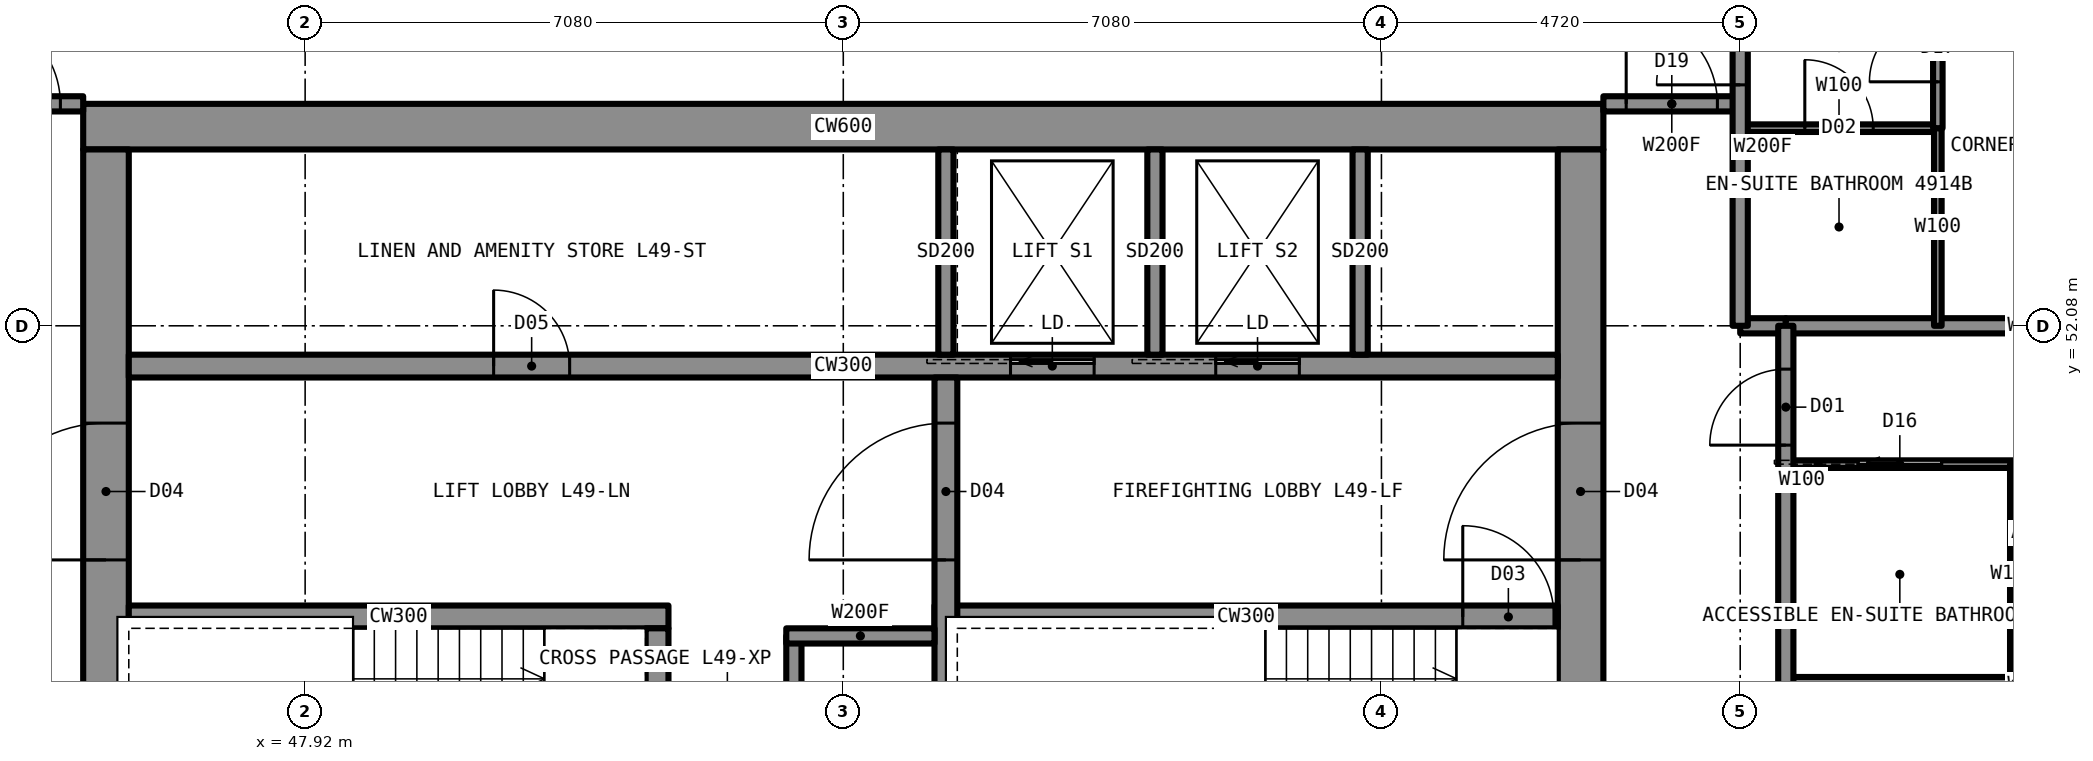
"""IFC4 building model, lengths in metres.
Left out: names, types, materials, properties, quantities, classifications, styles, units other than length and angle.
Written with IfcOpenShell. Run it as: python <this file> out.ifc"""

import sys

from ifc_helpers import new_model, si_unit, direction, frame, frame_2d, origin, place, context, subcontext, project, spatial, rectangle, extrude, element, fill, save


model = new_model("IFC4")
c1 = context("Model", 3, precision=1e-05, world=origin(), true_north=direction((0.0, 1.0)))
c2 = subcontext(c1, "Body", "Model", "MODEL_VIEW")
j1 = project(units=[si_unit("LENGTHUNIT", "METRE"), si_unit("PLANEANGLEUNIT", "RADIAN")], contexts=[c1])
p1 = place(None, origin())
s1 = spatial("IfcSite", under=j1, at=p1, CompositionType="ELEMENT")
p2 = place(p1, origin())
s2 = spatial("IfcBuilding", under=s1, at=p2, CompositionType="ELEMENT")
p3 = place(p2, frame((0.0, 0.0, 182.8)))
s3 = spatial("IfcBuildingStorey", under=s2, at=p3, CompositionType="ELEMENT", Elevation=182.8)
p4 = place(p3, frame((45.0, 54.7, 0.0), z_axis=(0.0, 0.0, 1.0), x_axis=(1.0, 0.0, 0.0)))
e1 = element("IfcWall", 1, at=p4, inside=s3, PredefinedType="SHEAR", context=c2, shape_type="SweptSolid", body=[
    extrude(rectangle(XDim=20.0, YDim=0.6, at=frame_2d((10.0, 0.0))), origin(), (0.0, 0.0, 1.0), 3.5),
])
p5 = place(p3, frame((64.7, 35.6, 0.0), z_axis=(0.0, 0.0, 1.0), x_axis=(0.0, 1.0, 0.0)))
e2 = element("IfcWall", 2, at=p5, inside=s3, PredefinedType="SHEAR", context=c2, shape_type="SweptSolid", body=[
    extrude(rectangle(XDim=18.8, YDim=0.6, at=frame_2d((9.4, 0.0))), origin(), (0.0, 0.0, 1.0), 3.5),
])
p6 = place(p5, frame((13.4, 0.0, 0.0)))
e3 = element("IfcOpeningElement", 3, at=p6, cuts=e2, PredefinedType="OPENING", context=c2, shape_type="SweptSolid", body=[
    extrude(rectangle(XDim=1.8, YDim=2.2, at=frame_2d((0.9, 1.1))), frame((0.0, 0.31, 0.0), z_axis=(0.0, -1.0, 0.0), x_axis=(1.0, 0.0, 0.0)), (0.0, 0.0, 1.0), 0.62),
])
p7 = place(p5, frame((3.6, 0.0, 0.0)))
e4 = element("IfcOpeningElement", 4, at=p7, cuts=e2, PredefinedType="OPENING", context=c2, shape_type="SweptSolid", body=[
    extrude(rectangle(XDim=1.8, YDim=2.2, at=frame_2d((0.9, 1.1))), frame((0.0, 0.31, 0.0), z_axis=(0.0, -1.0, 0.0), x_axis=(1.0, 0.0, 0.0)), (0.0, 0.0, 1.0), 0.62),
])
p8 = place(p3, frame((45.3, 35.6, 0.0), z_axis=(0.0, 0.0, 1.0), x_axis=(0.0, 1.0, 0.0)))
e5 = element("IfcWall", 5, at=p8, inside=s3, PredefinedType="SHEAR", context=c2, shape_type="SweptSolid", body=[
    extrude(rectangle(XDim=18.8, YDim=0.6, at=frame_2d((9.4, 0.0))), origin(), (0.0, 0.0, 1.0), 3.5),
])
p9 = place(p8, frame((13.4, 0.0, 0.0)))
e6 = element("IfcOpeningElement", 6, at=p9, cuts=e5, PredefinedType="OPENING", context=c2, shape_type="SweptSolid", body=[
    extrude(rectangle(XDim=1.8, YDim=2.2, at=frame_2d((0.9, 1.1))), frame((0.0, 0.31, 0.0), z_axis=(0.0, -1.0, 0.0), x_axis=(1.0, 0.0, 0.0)), (0.0, 0.0, 1.0), 0.62),
])
p10 = place(p8, frame((3.6, 0.0, 0.0)))
e7 = element("IfcOpeningElement", 7, at=p10, cuts=e5, PredefinedType="OPENING", context=c2, shape_type="SweptSolid", body=[
    extrude(rectangle(XDim=1.8, YDim=2.2, at=frame_2d((0.9, 1.1))), frame((0.0, 0.31, 0.0), z_axis=(0.0, -1.0, 0.0), x_axis=(1.0, 0.0, 0.0)), (0.0, 0.0, 1.0), 0.62),
])
p11 = place(p8, frame((6.4, 0.0, 0.0)))
e8 = element("IfcOpeningElement", 8, at=p11, cuts=e5, PredefinedType="OPENING", context=c2, shape_type="SweptSolid", body=[
    extrude(rectangle(XDim=1.2, YDim=2.2, at=frame_2d((0.6, 1.1))), frame((0.0, 0.31, 0.0), z_axis=(0.0, -1.0, 0.0), x_axis=(1.0, 0.0, 0.0)), (0.0, 0.0, 1.0), 0.62),
])
p12 = place(p3, frame((45.6, 51.55, 0.0), z_axis=(0.0, 0.0, 1.0), x_axis=(1.0, 0.0, 0.0)))
e9 = element("IfcWall", 9, at=p12, inside=s3, PredefinedType="SHEAR", context=c2, shape_type="SweptSolid", body=[
    extrude(rectangle(XDim=18.8, YDim=0.3, at=frame_2d((9.4, 0.0))), origin(), (0.0, 0.0, 1.0), 3.5),
])
p13 = place(p12, frame((4.8, 0.0, 0.0)))
e10 = element("IfcOpeningElement", 10, at=p13, cuts=e9, PredefinedType="OPENING", context=c2, shape_type="SweptSolid", body=[
    extrude(rectangle(XDim=1.0, YDim=2.1, at=frame_2d((0.5, 1.05))), frame((0.0, 0.16, 0.0), z_axis=(0.0, -1.0, 0.0), x_axis=(1.0, 0.0, 0.0)), (0.0, 0.0, 1.0), 0.32),
])
p14 = place(p12, frame((11.6, 0.0, 0.0)))
e11 = element("IfcOpeningElement", 11, at=p14, cuts=e9, PredefinedType="OPENING", context=c2, shape_type="SweptSolid", body=[
    extrude(rectangle(XDim=1.1, YDim=2.2, at=frame_2d((0.55, 1.1))), frame((0.0, 0.16, 0.0), z_axis=(0.0, -1.0, 0.0), x_axis=(1.0, 0.0, 0.0)), (0.0, 0.0, 1.0), 0.32),
])
p15 = place(p12, frame((14.3, 0.0, 0.0)))
e12 = element("IfcOpeningElement", 12, at=p15, cuts=e9, PredefinedType="OPENING", context=c2, shape_type="SweptSolid", body=[
    extrude(rectangle(XDim=1.1, YDim=2.2, at=frame_2d((0.55, 1.1))), frame((0.0, 0.16, 0.0), z_axis=(0.0, -1.0, 0.0), x_axis=(1.0, 0.0, 0.0)), (0.0, 0.0, 1.0), 0.32),
])
p16 = place(p3, frame((45.6, 48.25, 0.0), z_axis=(0.0, 0.0, 1.0), x_axis=(1.0, 0.0, 0.0)))
e13 = element("IfcWall", 13, at=p16, inside=s3, PredefinedType="SHEAR", context=c2, shape_type="SweptSolid", body=[
    extrude(rectangle(XDim=7.1, YDim=0.3, at=frame_2d((3.55, 0.0))), origin(), (0.0, 0.0, 1.0), 3.5),
])
p17 = place(p3, frame((56.2, 48.25, 0.0), z_axis=(0.0, 0.0, 1.0), x_axis=(1.0, 0.0, 0.0)))
e14 = element("IfcWall", 14, at=p17, inside=s3, PredefinedType="SHEAR", context=c2, shape_type="SweptSolid", body=[
    extrude(rectangle(XDim=8.2, YDim=0.3, at=frame_2d((4.1, 0.0))), origin(), (0.0, 0.0, 1.0), 3.5),
])
p18 = place(p17, frame((6.95, 0.0, 0.0)))
e15 = element("IfcOpeningElement", 15, at=p18, cuts=e14, PredefinedType="OPENING", context=c2, shape_type="SweptSolid", body=[
    extrude(rectangle(XDim=1.2, YDim=2.2, at=frame_2d((0.6, 1.1))), frame((0.0, 0.16, 0.0), z_axis=(0.0, -1.0, 0.0), x_axis=(1.0, 0.0, 0.0)), (0.0, 0.0, 1.0), 0.32),
])
p19 = place(p3, frame((52.55, 41.9, 0.0), z_axis=(0.0, 0.0, 1.0), x_axis=(0.0, 1.0, 0.0)))
e16 = element("IfcWall", 16, at=p19, inside=s3, PredefinedType="SHEAR", context=c2, shape_type="SweptSolid", body=[
    extrude(rectangle(XDim=6.2, YDim=0.3, at=frame_2d((3.1, 0.0))), origin(), (0.0, 0.0, 1.0), 3.5),
])
p20 = place(p19, frame((4.125, 0.0, 0.0)))
e17 = element("IfcOpeningElement", 17, at=p20, cuts=e16, PredefinedType="OPENING", context=c2, shape_type="SweptSolid", body=[
    extrude(rectangle(XDim=1.2, YDim=2.2, at=frame_2d((0.6, 1.1))), frame((0.0, 0.16, 0.0), z_axis=(0.0, -1.0, 0.0), x_axis=(1.0, 0.0, 0.0)), (0.0, 0.0, 1.0), 0.32),
])
p21 = place(p3, frame((56.35, 41.9, 0.0), z_axis=(0.0, 0.0, 1.0), x_axis=(0.0, 1.0, 0.0)))
e18 = element("IfcWall", 18, at=p21, inside=s3, PredefinedType="SHEAR", context=c2, shape_type="SweptSolid", body=[
    extrude(rectangle(XDim=9.5, YDim=0.3, at=frame_2d((4.75, 0.0))), origin(), (0.0, 0.0, 1.0), 3.5),
])
p22 = place(p21, frame((7.1, 0.0, 0.0)))
e19 = element("IfcOpeningElement", 19, at=p22, cuts=e18, PredefinedType="OPENING", context=c2, shape_type="SweptSolid", body=[
    extrude(rectangle(XDim=1.8, YDim=2.2, at=frame_2d((0.9, 1.1))), frame((0.0, 0.16, 0.0), z_axis=(0.0, -1.0, 0.0), x_axis=(1.0, 0.0, 0.0)), (0.0, 0.0, 1.0), 0.32),
])
p23 = place(p3, frame((43.2, 55.0, 0.0), z_axis=(0.0, 0.0, 1.0), x_axis=(1.0, 0.0, 0.0)))
e20 = element("IfcWall", 20, at=p23, inside=s3, PredefinedType="PARTITIONING", context=c2, shape_type="SweptSolid", body=[
    extrude(rectangle(XDim=1.8, YDim=0.2, at=frame_2d((0.9, 0.0))), origin(), (0.0, 0.0, 1.0), 3.33),
])
p24 = place(p23, frame((0.3, 0.0, 0.0)))
e21 = element("IfcOpeningElement", 21, at=p24, cuts=e20, PredefinedType="OPENING", context=c2, shape_type="SweptSolid", body=[
    extrude(rectangle(XDim=1.2, YDim=2.2, at=frame_2d((0.6, 1.1))), frame((0.0, 0.11, 0.0), z_axis=(0.0, -1.0, 0.0), x_axis=(1.0, 0.0, 0.0)), (0.0, 0.0, 1.0), 0.22),
])
p25 = place(p3, frame((65.0, 55.0, 0.0), z_axis=(0.0, 0.0, 1.0), x_axis=(1.0, 0.0, 0.0)))
e22 = element("IfcWall", 22, at=p25, inside=s3, PredefinedType="PARTITIONING", context=c2, shape_type="SweptSolid", body=[
    extrude(rectangle(XDim=1.8, YDim=0.2, at=frame_2d((0.9, 0.0))), origin(), (0.0, 0.0, 1.0), 3.33),
])
p26 = place(p25, frame((0.3, 0.0, 0.0)))
e23 = element("IfcOpeningElement", 23, at=p26, cuts=e22, PredefinedType="OPENING", context=c2, shape_type="SweptSolid", body=[
    extrude(rectangle(XDim=1.2, YDim=2.2, at=frame_2d((0.6, 1.1))), frame((0.0, 0.11, 0.0), z_axis=(0.0, -1.0, 0.0), x_axis=(1.0, 0.0, 0.0)), (0.0, 0.0, 1.0), 0.22),
])
p27 = place(p3, frame((67.4, 47.36, 0.0), z_axis=(0.0, 0.0, 1.0), x_axis=(1.0, 0.0, 0.0)))
e24 = element("IfcWall", 24, at=p27, inside=s3, PredefinedType="PARTITIONING", context=c2, shape_type="SweptSolid", body=[
    extrude(rectangle(XDim=6.6, YDim=0.2, at=frame_2d((3.3, 0.0))), origin(), (0.0, 0.0, 1.0), 2.73),
])
p28 = place(p3, frame((67.4, 50.26, 0.0), z_axis=(0.0, 0.0, 1.0), x_axis=(1.0, 0.0, 0.0)))
e25 = element("IfcWall", 25, at=p28, inside=s3, PredefinedType="PARTITIONING", context=c2, shape_type="SweptSolid", body=[
    extrude(rectangle(XDim=3.0, YDim=0.1, at=frame_2d((1.5, 0.0))), origin(), (0.0, 0.0, 1.0), 3.33),
])
p29 = place(p28, frame((0.95, 0.0, 0.0)))
e26 = element("IfcOpeningElement", 26, at=p29, cuts=e25, PredefinedType="OPENING", context=c2, shape_type="SweptSolid", body=[
    extrude(rectangle(XDim=1.1, YDim=2.1, at=frame_2d((0.55, 1.05))), frame((0.0, 0.06, 0.0), z_axis=(0.0, -1.0, 0.0), x_axis=(1.0, 0.0, 0.0)), (0.0, 0.0, 1.0), 0.12),
])
p30 = place(p3, frame((66.8, 52.08, 0.0), z_axis=(0.0, 0.0, 1.0), x_axis=(1.0, 0.0, 0.0)))
e27 = element("IfcWall", 27, at=p30, inside=s3, PredefinedType="PARTITIONING", context=c2, shape_type="SweptSolid", body=[
    extrude(rectangle(XDim=0.6, YDim=0.2, at=frame_2d((0.3, 0.0))), origin(), (0.0, 0.0, 1.0), 2.573),
])
p31 = place(p3, frame((67.4, 52.08, 0.0), z_axis=(0.0, 0.0, 1.0), x_axis=(1.0, 0.0, 0.0)))
e28 = element("IfcWall", 28, at=p31, inside=s3, PredefinedType="PARTITIONING", context=c2, shape_type="SweptSolid", body=[
    extrude(rectangle(XDim=6.6, YDim=0.2, at=frame_2d((3.3, 0.0))), origin(), (0.0, 0.0, 1.0), 2.573),
])
p32 = place(p3, frame((66.8, 54.68, 0.0), z_axis=(0.0, 0.0, 1.0), x_axis=(1.0, 0.0, 0.0)))
e29 = element("IfcWall", 29, at=p32, inside=s3, PredefinedType="PARTITIONING", context=c2, shape_type="SweptSolid", body=[
    extrude(rectangle(XDim=2.6, YDim=0.1, at=frame_2d((1.3, 0.0))), origin(), (0.0, 0.0, 1.0), 3.33),
])
p33 = place(p32, frame((0.85, 0.0, 0.0)))
e30 = element("IfcOpeningElement", 30, at=p33, cuts=e29, PredefinedType="OPENING", context=c2, shape_type="SweptSolid", body=[
    extrude(rectangle(XDim=0.9, YDim=2.1, at=frame_2d((0.45, 1.05))), frame((0.0, 0.06, 0.0), z_axis=(0.0, -1.0, 0.0), x_axis=(1.0, 0.0, 0.0)), (0.0, 0.0, 1.0), 0.12),
])
p34 = place(p3, frame((66.8, 52.08, 0.0), z_axis=(0.0, 0.0, 1.0), x_axis=(0.0, 1.0, 0.0)))
e31 = element("IfcWall", 31, at=p34, inside=s3, PredefinedType="PARTITIONING", context=c2, shape_type="SweptSolid", body=[
    extrude(rectangle(XDim=4.7, YDim=0.2, at=frame_2d((2.35, 0.0))), origin(), (0.0, 0.0, 1.0), 3.33),
])
p35 = place(p34, frame((3.17, 0.0, 0.0)))
e32 = element("IfcOpeningElement", 32, at=p35, cuts=e31, PredefinedType="OPENING", context=c2, shape_type="SweptSolid", body=[
    extrude(rectangle(XDim=1.1, YDim=2.2, at=frame_2d((0.55, 1.1))), frame((0.0, 0.11, 0.0), z_axis=(0.0, -1.0, 0.0), x_axis=(1.0, 0.0, 0.0)), (0.0, 0.0, 1.0), 0.22),
])
p36 = place(p3, frame((67.4, 37.92, 0.0), z_axis=(0.0, 0.0, 1.0), x_axis=(0.0, 1.0, 0.0)))
e33 = element("IfcWall", 33, at=p36, inside=s3, PredefinedType="PARTITIONING", context=c2, shape_type="SweptSolid", body=[
    extrude(rectangle(XDim=14.16, YDim=0.2, at=frame_2d((7.08, 0.0))), origin(), (0.0, 0.0, 1.0), 3.33),
])
p37 = place(p36, frame((3.0, 0.0, 0.0)))
e34 = element("IfcOpeningElement", 34, at=p37, cuts=e33, PredefinedType="OPENING", context=c2, shape_type="SweptSolid", body=[
    extrude(rectangle(XDim=1.0, YDim=2.2, at=frame_2d((0.5, 1.1))), frame((0.0, 0.11, 0.0), z_axis=(0.0, -1.0, 0.0), x_axis=(1.0, 0.0, 0.0)), (0.0, 0.0, 1.0), 0.22),
])
p38 = place(p36, frame((12.59, 0.0, 0.0)))
e35 = element("IfcOpeningElement", 35, at=p38, cuts=e33, PredefinedType="OPENING", context=c2, shape_type="SweptSolid", body=[
    extrude(rectangle(XDim=1.0, YDim=2.2, at=frame_2d((0.5, 1.1))), frame((0.0, 0.11, 0.0), z_axis=(0.0, -1.0, 0.0), x_axis=(1.0, 0.0, 0.0)), (0.0, 0.0, 1.0), 0.22),
])
p39 = place(p3, frame((69.4, 52.08, 0.0), z_axis=(0.0, 0.0, 1.0), x_axis=(0.0, 1.0, 0.0)))
e36 = element("IfcWall", 36, at=p39, inside=s3, PredefinedType="PARTITIONING", context=c2, shape_type="SweptSolid", body=[
    extrude(rectangle(XDim=2.6, YDim=0.1, at=frame_2d((1.3, 0.0))), origin(), (0.0, 0.0, 1.0), 3.33),
])
p40 = place(p3, frame((69.4, 54.68, 0.0), z_axis=(0.0, 0.0, 1.0), x_axis=(0.0, 1.0, 0.0)))
e37 = element("IfcWall", 37, at=p40, inside=s3, PredefinedType="PARTITIONING", context=c2, shape_type="SweptSolid", body=[
    extrude(rectangle(XDim=2.12, YDim=0.125, at=frame_2d((1.06, 0.0))), origin(), (0.0, 0.0, 1.0), 3.33),
])
p41 = place(p40, frame((0.61, 0.0, 0.0)))
e38 = element("IfcOpeningElement", 38, at=p41, cuts=e37, PredefinedType="OPENING", context=c2, shape_type="SweptSolid", body=[
    extrude(rectangle(XDim=0.9, YDim=2.2, at=frame_2d((0.45, 1.1))), frame((0.0, 0.073, 0.0), z_axis=(0.0, -1.0, 0.0), x_axis=(1.0, 0.0, 0.0)), (0.0, 0.0, 1.0), 0.145),
])
p42 = place(p3, frame((70.4, 47.36, 0.0), z_axis=(0.0, 0.0, 1.0), x_axis=(0.0, 1.0, 0.0)))
e39 = element("IfcWall", 39, at=p42, inside=s3, PredefinedType="PARTITIONING", context=c2, shape_type="SweptSolid", body=[
    extrude(rectangle(XDim=2.9, YDim=0.1, at=frame_2d((1.45, 0.0))), origin(), (0.0, 0.0, 1.0), 3.33),
])
p43 = place(p3, frame((54.35, 44.1, 0.0), z_axis=(0.0, 0.0, 1.0), x_axis=(0.0, 1.0, 0.0)))
e40 = element("IfcWall", 40, at=p43, inside=s3, PredefinedType="PARTITIONING", context=c2, shape_type="SweptSolid", body=[
    extrude(rectangle(XDim=3.9, YDim=0.2, at=frame_2d((1.95, 0.0))), origin(), (0.0, 0.0, 1.0), 3.33),
])
p44 = place(p43, frame((1.45, 0.0, 0.0)))
e41 = element("IfcOpeningElement", 41, at=p44, cuts=e40, PredefinedType="OPENING", context=c2, shape_type="SweptSolid", body=[
    extrude(rectangle(XDim=1.0, YDim=2.1, at=frame_2d((0.5, 1.05))), frame((0.0, 0.11, 0.0), z_axis=(0.0, -1.0, 0.0), x_axis=(1.0, 0.0, 0.0)), (0.0, 0.0, 1.0), 0.22),
])
p45 = place(p3, frame((54.25, 48.0, 0.0), z_axis=(0.0, 0.0, 1.0), x_axis=(1.0, 0.0, 0.0)))
e42 = element("IfcWall", 42, at=p45, inside=s3, PredefinedType="PARTITIONING", context=c2, shape_type="SweptSolid", body=[
    extrude(rectangle(XDim=1.95, YDim=0.2, at=frame_2d((0.975, 0.0))), origin(), (0.0, 0.0, 1.0), 3.33),
])
for number, where, z_axis, x_axis in (
    (43, (59.1, 51.7, 0.0), (0.0, 0.0, 1.0), (0.0, 1.0, 0.0)),
    (44, (61.8, 51.7, 0.0), (0.0, 0.0, 1.0), (0.0, 1.0, 0.0)),
    (45, (56.35, 51.7, 0.0), (0.0, 0.0, 1.0), (0.0, 1.0, 0.0)),
):
    element("IfcWall", number, at=place(p3, frame(where, z_axis=z_axis, x_axis=x_axis)), inside=s3, PredefinedType="PARTITIONING", context=c2, shape_type="SweptSolid", body=[
        extrude(rectangle(XDim=2.7, YDim=0.2, at=frame_2d((1.35, 0.0))), origin(), (0.0, 0.0, 1.0), 3.33),
    ])
p46 = place(p24, origin())
e46 = element("IfcDoor", 46, at=p46, inside=s3, OperationType="SINGLE_SWING_LEFT", PredefinedType="DOOR", context=c2, shape_type="SweptSolid", body=[
    extrude(rectangle(XDim=1.2, YDim=2.2, at=frame_2d((0.6, 1.1))), frame((0.0, 0.025, 0.0), z_axis=(0.0, -1.0, 0.0), x_axis=(1.0, 0.0, 0.0)), (0.0, 0.0, 1.0), 0.05),
])
fill(e21, e46)
p47 = place(p26, origin())
e47 = element("IfcDoor", 47, at=p47, inside=s3, OperationType="SINGLE_SWING_LEFT", PredefinedType="DOOR", context=c2, shape_type="SweptSolid", body=[
    extrude(rectangle(XDim=1.2, YDim=2.2, at=frame_2d((0.6, 1.1))), frame((0.0, 0.025, 0.0), z_axis=(0.0, -1.0, 0.0), x_axis=(1.0, 0.0, 0.0)), (0.0, 0.0, 1.0), 0.05),
])
fill(e23, e47)
p48 = place(p38, origin())
e48 = element("IfcDoor", 48, at=p48, inside=s3, OperationType="SINGLE_SWING_LEFT", PredefinedType="DOOR", context=c2, shape_type="SweptSolid", body=[
    extrude(rectangle(XDim=1.0, YDim=2.2, at=frame_2d((0.5, 1.1))), frame((0.0, 0.025, 0.0), z_axis=(0.0, -1.0, 0.0), x_axis=(1.0, 0.0, 0.0)), (0.0, 0.0, 1.0), 0.05),
])
fill(e35, e48)
p49 = place(p29, origin())
e49 = element("IfcDoor", 49, at=p49, inside=s3, OperationType="SLIDING_TO_LEFT", PredefinedType="DOOR", context=c2, shape_type="SweptSolid", body=[
    extrude(rectangle(XDim=1.1, YDim=2.1, at=frame_2d((0.55, 1.05))), frame((0.0, 0.025, 0.0), z_axis=(0.0, -1.0, 0.0), x_axis=(1.0, 0.0, 0.0)), (0.0, 0.0, 1.0), 0.05),
])
fill(e26, e49)
p50 = place(p33, origin())
e50 = element("IfcDoor", 50, at=p50, inside=s3, OperationType="SINGLE_SWING_RIGHT", PredefinedType="DOOR", context=c2, shape_type="SweptSolid", body=[
    extrude(rectangle(XDim=0.9, YDim=2.1, at=frame_2d((0.45, 1.05))), frame((0.0, 0.025, 0.0), z_axis=(0.0, -1.0, 0.0), x_axis=(1.0, 0.0, 0.0)), (0.0, 0.0, 1.0), 0.05),
])
fill(e30, e50)
p51 = place(p35, origin())
e51 = element("IfcDoor", 51, at=p51, inside=s3, OperationType="SINGLE_SWING_LEFT", PredefinedType="DOOR", context=c2, shape_type="SweptSolid", body=[
    extrude(rectangle(XDim=1.1, YDim=2.2, at=frame_2d((0.55, 1.1))), frame((0.0, 0.025, 0.0), z_axis=(0.0, -1.0, 0.0), x_axis=(1.0, 0.0, 0.0)), (0.0, 0.0, 1.0), 0.05),
])
fill(e32, e51)
p52 = place(p41, origin())
e52 = element("IfcDoor", 52, at=p52, inside=s3, OperationType="SINGLE_SWING_LEFT", PredefinedType="DOOR", context=c2, shape_type="SweptSolid", body=[
    extrude(rectangle(XDim=0.9, YDim=2.2, at=frame_2d((0.45, 1.1))), frame((0.0, 0.025, 0.0), z_axis=(0.0, -1.0, 0.0), x_axis=(1.0, 0.0, 0.0)), (0.0, 0.0, 1.0), 0.05),
])
fill(e38, e52)
p53 = place(p9, origin())
e53 = element("IfcDoor", 53, at=p53, inside=s3, OperationType="DOUBLE_DOOR_SINGLE_SWING", PredefinedType="DOOR", context=c2, shape_type="SweptSolid", body=[
    extrude(rectangle(XDim=1.8, YDim=2.2, at=frame_2d((0.9, 1.1))), frame((0.0, 0.025, 0.0), z_axis=(0.0, -1.0, 0.0), x_axis=(1.0, 0.0, 0.0)), (0.0, 0.0, 1.0), 0.05),
])
fill(e6, e53)
p54 = place(p6, origin())
e54 = element("IfcDoor", 54, at=p54, inside=s3, OperationType="DOUBLE_DOOR_SINGLE_SWING", PredefinedType="DOOR", context=c2, shape_type="SweptSolid", body=[
    extrude(rectangle(XDim=1.8, YDim=2.2, at=frame_2d((0.9, 1.1))), frame((0.0, 0.025, 0.0), z_axis=(0.0, -1.0, 0.0), x_axis=(1.0, 0.0, 0.0)), (0.0, 0.0, 1.0), 0.05),
])
fill(e3, e54)
p55 = place(p22, origin())
e55 = element("IfcDoor", 55, at=p55, inside=s3, OperationType="DOUBLE_DOOR_SINGLE_SWING", PredefinedType="DOOR", context=c2, shape_type="SweptSolid", body=[
    extrude(rectangle(XDim=1.8, YDim=2.2, at=frame_2d((0.9, 1.1))), frame((0.0, 0.025, 0.0), z_axis=(0.0, -1.0, 0.0), x_axis=(1.0, 0.0, 0.0)), (0.0, 0.0, 1.0), 0.05),
])
fill(e19, e55)
p56 = place(p18, origin())
e56 = element("IfcDoor", 56, at=p56, inside=s3, OperationType="SINGLE_SWING_LEFT", PredefinedType="DOOR", context=c2, shape_type="SweptSolid", body=[
    extrude(rectangle(XDim=1.2, YDim=2.2, at=frame_2d((0.6, 1.1))), frame((0.0, 0.025, 0.0), z_axis=(0.0, -1.0, 0.0), x_axis=(1.0, 0.0, 0.0)), (0.0, 0.0, 1.0), 0.05),
])
fill(e15, e56)
p57 = place(p13, origin())
e57 = element("IfcDoor", 57, at=p57, inside=s3, OperationType="SINGLE_SWING_LEFT", PredefinedType="DOOR", context=c2, shape_type="SweptSolid", body=[
    extrude(rectangle(XDim=1.0, YDim=2.1, at=frame_2d((0.5, 1.05))), frame((0.0, 0.025, 0.0), z_axis=(0.0, -1.0, 0.0), x_axis=(1.0, 0.0, 0.0)), (0.0, 0.0, 1.0), 0.05),
])
fill(e10, e57)
p58 = place(p14, origin())
e58 = element("IfcDoor", 58, at=p58, inside=s3, OperationType="SLIDING_TO_LEFT", PredefinedType="DOOR", context=c2, shape_type="SweptSolid", body=[
    extrude(rectangle(XDim=1.1, YDim=2.2, at=frame_2d((0.55, 1.1))), frame((0.0, 0.025, 0.0), z_axis=(0.0, -1.0, 0.0), x_axis=(1.0, 0.0, 0.0)), (0.0, 0.0, 1.0), 0.05),
])
fill(e11, e58)
p59 = place(p15, origin())
e59 = element("IfcDoor", 59, at=p59, inside=s3, OperationType="SLIDING_TO_LEFT", PredefinedType="DOOR", context=c2, shape_type="SweptSolid", body=[
    extrude(rectangle(XDim=1.1, YDim=2.2, at=frame_2d((0.55, 1.1))), frame((0.0, 0.025, 0.0), z_axis=(0.0, -1.0, 0.0), x_axis=(1.0, 0.0, 0.0)), (0.0, 0.0, 1.0), 0.05),
])
fill(e12, e59)
save(model, sys.argv[1])
